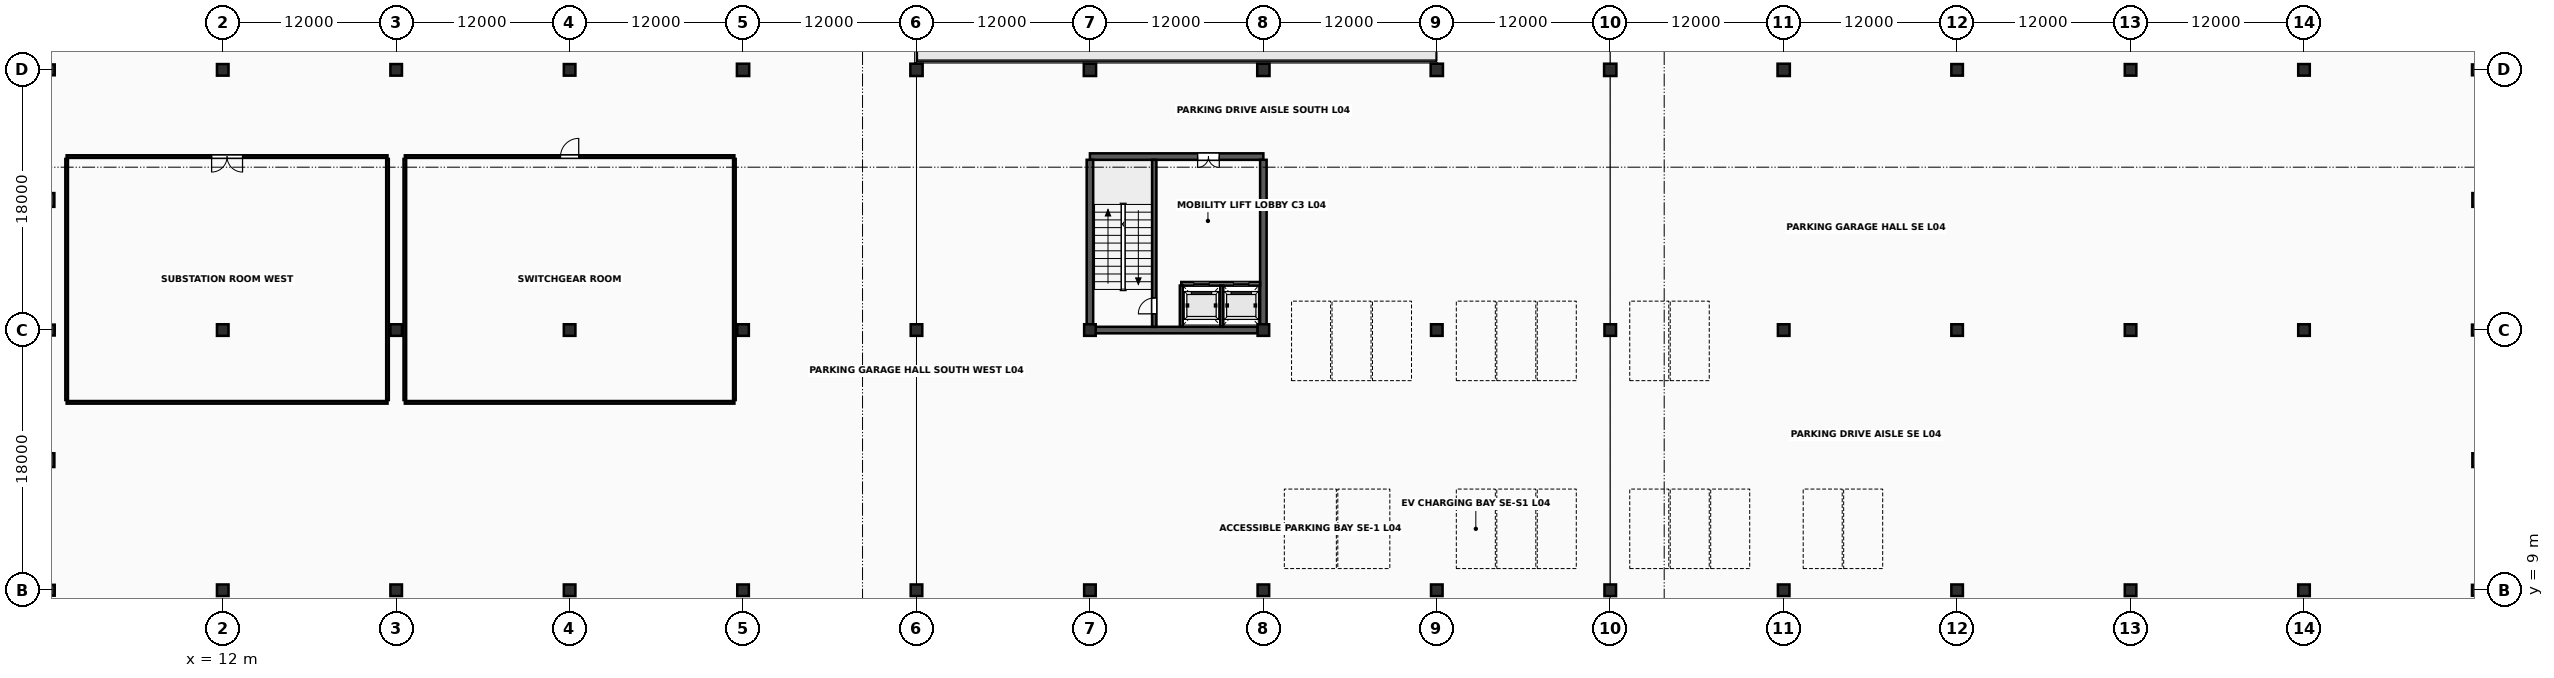
"""IFC4 building model, lengths in metres.
Left out: names, types, materials, properties, quantities, classifications, styles, units other than length and angle.
Written with IfcOpenShell. Run it as: python <this file> out.ifc"""

import sys

from ifc_helpers import new_model, si_unit, direction, frame, frame_2d, origin, origin_2d, place, context, subcontext, project, spatial, rectangle, extrude, element, fill, save


model = new_model("IFC4")
c1 = context("Model", 3, precision=1e-05, world=origin(), true_north=direction((0.0, 1.0)))
c2 = subcontext(c1, "Body", "Model", "MODEL_VIEW")
j1 = project(units=[si_unit("LENGTHUNIT", "METRE"), si_unit("PLANEANGLEUNIT", "RADIAN")], contexts=[c1])
p1 = place(None, origin())
s1 = spatial("IfcSite", under=j1, at=p1, CompositionType="ELEMENT")
p2 = place(p1, origin())
s2 = spatial("IfcBuilding", under=s1, at=p2, CompositionType="ELEMENT")
p3 = place(p2, frame((0.0, 0.0, 17.2)))
s3 = spatial("IfcBuildingStorey", under=s2, at=p3, CompositionType="ELEMENT", Elevation=17.2)
for number, where, z_axis, x_axis in (
    (1, (0.0, 9.0, 0.0), (0.0, 0.0, 1.0), (1.0, 0.0, 0.0)),
    (2, (0.0, 27.0, 0.0), (0.0, 0.0, 1.0), (1.0, 0.0, 0.0)),
    (3, (0.0, 45.0, 0.0), (0.0, 0.0, 1.0), (1.0, 0.0, 0.0)),
):
    element("IfcColumn", number, at=place(p3, frame(where, z_axis=z_axis, x_axis=x_axis)), inside=s3, PredefinedType="COLUMN", context=c2, shape_type="SweptSolid", body=[
        extrude(rectangle(XDim=0.75, YDim=0.75, at=origin_2d()), origin(), (0.0, 0.0, 1.0), 3.8),
    ])
for number, where, z_axis, x_axis in (
    (4, (12.0, 9.0, 0.0), (0.0, 0.0, 1.0), (1.0, 0.0, 0.0)),
    (5, (12.0, 27.0, 0.0), (0.0, 0.0, 1.0), (1.0, 0.0, 0.0)),
    (6, (12.0, 45.0, 0.0), (0.0, 0.0, 1.0), (1.0, 0.0, 0.0)),
    (7, (24.0, 9.0, 0.0), (0.0, 0.0, 1.0), (1.0, 0.0, 0.0)),
    (8, (24.0, 27.0, 0.0), (0.0, 0.0, 1.0), (1.0, 0.0, 0.0)),
    (9, (24.0, 45.0, 0.0), (0.0, 0.0, 1.0), (1.0, 0.0, 0.0)),
    (10, (36.0, 9.0, 0.0), (0.0, 0.0, 1.0), (1.0, 0.0, 0.0)),
    (11, (36.0, 27.0, 0.0), (0.0, 0.0, 1.0), (1.0, 0.0, 0.0)),
    (12, (36.0, 45.0, 0.0), (0.0, 0.0, 1.0), (1.0, 0.0, 0.0)),
    (13, (48.0, 9.0, 0.0), (0.0, 0.0, 1.0), (1.0, 0.0, 0.0)),
    (14, (48.0, 27.0, 0.0), (0.0, 0.0, 1.0), (1.0, 0.0, 0.0)),
):
    element("IfcColumn", number, at=place(p3, frame(where, z_axis=z_axis, x_axis=x_axis)), inside=s3, PredefinedType="COLUMN", context=c2, shape_type="SweptSolid", body=[
        extrude(rectangle(XDim=0.8, YDim=0.8, at=origin_2d()), origin(), (0.0, 0.0, 1.0), 3.8),
    ])
p4 = place(p3, frame((48.0, 45.0, 0.0), z_axis=(0.0, 0.0, 1.0), x_axis=(1.0, 0.0, 0.0)))
e15 = element("IfcColumn", 15, at=p4, inside=s3, PredefinedType="COLUMN", context=c2, shape_type="SweptSolid", body=[
    extrude(rectangle(XDim=0.85, YDim=0.85, at=origin_2d()), origin(), (0.0, 0.0, 1.0), 3.8),
])
for number, where, z_axis, x_axis in (
    (16, (60.0, 9.0, 0.0), (0.0, 0.0, 1.0), (1.0, 0.0, 0.0)),
    (17, (60.0, 27.0, 0.0), (0.0, 0.0, 1.0), (1.0, 0.0, 0.0)),
):
    element("IfcColumn", number, at=place(p3, frame(where, z_axis=z_axis, x_axis=x_axis)), inside=s3, PredefinedType="COLUMN", context=c2, shape_type="SweptSolid", body=[
        extrude(rectangle(XDim=0.8, YDim=0.8, at=origin_2d()), origin(), (0.0, 0.0, 1.0), 3.8),
    ])
p5 = place(p3, frame((60.0, 45.0, 0.0), z_axis=(0.0, 0.0, 1.0), x_axis=(1.0, 0.0, 0.0)))
e18 = element("IfcColumn", 18, at=p5, inside=s3, PredefinedType="COLUMN", context=c2, shape_type="SweptSolid", body=[
    extrude(rectangle(XDim=0.85, YDim=0.85, at=origin_2d()), origin(), (0.0, 0.0, 1.0), 3.8),
])
for number, where, z_axis, x_axis in (
    (19, (72.0, 9.0, 0.0), (0.0, 0.0, 1.0), (1.0, 0.0, 0.0)),
    (20, (72.0, 27.0, 0.0), (0.0, 0.0, 1.0), (1.0, 0.0, 0.0)),
):
    element("IfcColumn", number, at=place(p3, frame(where, z_axis=z_axis, x_axis=x_axis)), inside=s3, PredefinedType="COLUMN", context=c2, shape_type="SweptSolid", body=[
        extrude(rectangle(XDim=0.8, YDim=0.8, at=origin_2d()), origin(), (0.0, 0.0, 1.0), 3.8),
    ])
p6 = place(p3, frame((72.0, 45.0, 0.0), z_axis=(0.0, 0.0, 1.0), x_axis=(1.0, 0.0, 0.0)))
e21 = element("IfcColumn", 21, at=p6, inside=s3, PredefinedType="COLUMN", context=c2, shape_type="SweptSolid", body=[
    extrude(rectangle(XDim=0.85, YDim=0.85, at=origin_2d()), origin(), (0.0, 0.0, 1.0), 3.8),
])
for number, where, z_axis, x_axis in (
    (22, (84.0, 9.0, 0.0), (0.0, 0.0, 1.0), (1.0, 0.0, 0.0)),
    (23, (84.0, 27.0, 0.0), (0.0, 0.0, 1.0), (1.0, 0.0, 0.0)),
):
    element("IfcColumn", number, at=place(p3, frame(where, z_axis=z_axis, x_axis=x_axis)), inside=s3, PredefinedType="COLUMN", context=c2, shape_type="SweptSolid", body=[
        extrude(rectangle(XDim=0.8, YDim=0.8, at=origin_2d()), origin(), (0.0, 0.0, 1.0), 3.8),
    ])
p7 = place(p3, frame((84.0, 45.0, 0.0), z_axis=(0.0, 0.0, 1.0), x_axis=(1.0, 0.0, 0.0)))
e24 = element("IfcColumn", 24, at=p7, inside=s3, PredefinedType="COLUMN", context=c2, shape_type="SweptSolid", body=[
    extrude(rectangle(XDim=0.85, YDim=0.85, at=origin_2d()), origin(), (0.0, 0.0, 1.0), 3.8),
])
for number, where, z_axis, x_axis in (
    (25, (96.0, 9.0, 0.0), (0.0, 0.0, 1.0), (1.0, 0.0, 0.0)),
    (26, (96.0, 27.0, 0.0), (0.0, 0.0, 1.0), (1.0, 0.0, 0.0)),
):
    element("IfcColumn", number, at=place(p3, frame(where, z_axis=z_axis, x_axis=x_axis)), inside=s3, PredefinedType="COLUMN", context=c2, shape_type="SweptSolid", body=[
        extrude(rectangle(XDim=0.8, YDim=0.8, at=origin_2d()), origin(), (0.0, 0.0, 1.0), 3.8),
    ])
p8 = place(p3, frame((96.0, 45.0, 0.0), z_axis=(0.0, 0.0, 1.0), x_axis=(1.0, 0.0, 0.0)))
e27 = element("IfcColumn", 27, at=p8, inside=s3, PredefinedType="COLUMN", context=c2, shape_type="SweptSolid", body=[
    extrude(rectangle(XDim=0.85, YDim=0.85, at=origin_2d()), origin(), (0.0, 0.0, 1.0), 3.8),
])
for number, where, z_axis, x_axis in (
    (28, (108.0, 9.0, 0.0), (0.0, 0.0, 1.0), (1.0, 0.0, 0.0)),
    (29, (108.0, 27.0, 0.0), (0.0, 0.0, 1.0), (1.0, 0.0, 0.0)),
):
    element("IfcColumn", number, at=place(p3, frame(where, z_axis=z_axis, x_axis=x_axis)), inside=s3, PredefinedType="COLUMN", context=c2, shape_type="SweptSolid", body=[
        extrude(rectangle(XDim=0.8, YDim=0.8, at=origin_2d()), origin(), (0.0, 0.0, 1.0), 3.8),
    ])
p9 = place(p3, frame((108.0, 45.0, 0.0), z_axis=(0.0, 0.0, 1.0), x_axis=(1.0, 0.0, 0.0)))
e30 = element("IfcColumn", 30, at=p9, inside=s3, PredefinedType="COLUMN", context=c2, shape_type="SweptSolid", body=[
    extrude(rectangle(XDim=0.85, YDim=0.85, at=origin_2d()), origin(), (0.0, 0.0, 1.0), 3.8),
])
for number, where, z_axis, x_axis in (
    (31, (120.0, 9.0, 0.0), (0.0, 0.0, 1.0), (1.0, 0.0, 0.0)),
    (32, (120.0, 27.0, 0.0), (0.0, 0.0, 1.0), (1.0, 0.0, 0.0)),
):
    element("IfcColumn", number, at=place(p3, frame(where, z_axis=z_axis, x_axis=x_axis)), inside=s3, PredefinedType="COLUMN", context=c2, shape_type="SweptSolid", body=[
        extrude(rectangle(XDim=0.8, YDim=0.8, at=origin_2d()), origin(), (0.0, 0.0, 1.0), 3.8),
    ])
p10 = place(p3, frame((120.0, 45.0, 0.0), z_axis=(0.0, 0.0, 1.0), x_axis=(1.0, 0.0, 0.0)))
e33 = element("IfcColumn", 33, at=p10, inside=s3, PredefinedType="COLUMN", context=c2, shape_type="SweptSolid", body=[
    extrude(rectangle(XDim=0.85, YDim=0.85, at=origin_2d()), origin(), (0.0, 0.0, 1.0), 3.8),
])
for number, where, z_axis, x_axis in (
    (34, (132.0, 9.0, 0.0), (0.0, 0.0, 1.0), (1.0, 0.0, 0.0)),
    (35, (132.0, 27.0, 0.0), (0.0, 0.0, 1.0), (1.0, 0.0, 0.0)),
    (36, (132.0, 45.0, 0.0), (0.0, 0.0, 1.0), (1.0, 0.0, 0.0)),
    (37, (144.0, 9.0, 0.0), (0.0, 0.0, 1.0), (1.0, 0.0, 0.0)),
    (38, (144.0, 27.0, 0.0), (0.0, 0.0, 1.0), (1.0, 0.0, 0.0)),
    (39, (144.0, 45.0, 0.0), (0.0, 0.0, 1.0), (1.0, 0.0, 0.0)),
    (40, (156.0, 9.0, 0.0), (0.0, 0.0, 1.0), (1.0, 0.0, 0.0)),
    (41, (156.0, 27.0, 0.0), (0.0, 0.0, 1.0), (1.0, 0.0, 0.0)),
    (42, (156.0, 45.0, 0.0), (0.0, 0.0, 1.0), (1.0, 0.0, 0.0)),
):
    element("IfcColumn", number, at=place(p3, frame(where, z_axis=z_axis, x_axis=x_axis)), inside=s3, PredefinedType="COLUMN", context=c2, shape_type="SweptSolid", body=[
        extrude(rectangle(XDim=0.8, YDim=0.8, at=origin_2d()), origin(), (0.0, 0.0, 1.0), 3.8),
    ])
for number, where, z_axis, x_axis in (
    (43, (168.0, 9.0, 0.0), (0.0, 0.0, 1.0), (1.0, 0.0, 0.0)),
    (44, (168.0, 27.0, 0.0), (0.0, 0.0, 1.0), (1.0, 0.0, 0.0)),
    (45, (168.0, 45.0, 0.0), (0.0, 0.0, 1.0), (1.0, 0.0, 0.0)),
):
    element("IfcColumn", number, at=place(p3, frame(where, z_axis=z_axis, x_axis=x_axis)), inside=s3, PredefinedType="COLUMN", context=c2, shape_type="SweptSolid", body=[
        extrude(rectangle(XDim=0.75, YDim=0.75, at=origin_2d()), origin(), (0.0, 0.0, 1.0), 3.8),
    ])
for number, where, z_axis, x_axis in (
    (46, (0.0, 18.0, 0.0), (0.0, 0.0, 1.0), (1.0, 0.0, 0.0)),
    (47, (0.0, 36.0, 0.0), (0.0, 0.0, 1.0), (1.0, 0.0, 0.0)),
    (48, (168.0, 18.0, 0.0), (0.0, 0.0, 1.0), (1.0, 0.0, 0.0)),
    (49, (168.0, 36.0, 0.0), (0.0, 0.0, 1.0), (1.0, 0.0, 0.0)),
):
    element("IfcColumn", number, at=place(p3, frame(where, z_axis=z_axis, x_axis=x_axis)), inside=s3, PredefinedType="PILASTER", context=c2, shape_type="SweptSolid", body=[
        extrude(rectangle(XDim=0.7, YDim=0.95, at=origin_2d()), origin(), (0.0, 0.0, 1.0), 3.8),
    ])
p11 = place(p3, frame((72.397, 27.0, 0.0), z_axis=(0.0, 0.0, 1.0), x_axis=(1.0, 0.0, 0.0)))
e50 = element("IfcWall", 50, at=p11, inside=s3, PredefinedType="SHEAR", context=c2, shape_type="SweptSolid", body=[
    extrude(rectangle(XDim=11.206, YDim=0.45, at=frame_2d((5.603, 0.0))), origin(), (0.0, 0.0, 1.0), 3.643),
])
p12 = place(p3, frame((72.0, 39.0, 0.0), z_axis=(0.0, 0.0, 1.0), x_axis=(1.0, 0.0, 0.0)))
e51 = element("IfcWall", 51, at=p12, inside=s3, PredefinedType="SHEAR", context=c2, shape_type="SweptSolid", body=[
    extrude(rectangle(XDim=12.0, YDim=0.45, at=frame_2d((6.0, 0.0))), origin(), (0.0, 0.0, 1.0), 3.643),
])
p13 = place(p12, frame((7.45, 0.0, 0.0)))
e52 = element("IfcOpeningElement", 52, at=p13, cuts=e51, PredefinedType="OPENING", context=c2, shape_type="SweptSolid", body=[
    extrude(rectangle(XDim=1.5, YDim=2.25, at=frame_2d((0.75, 1.125))), frame((0.0, 0.24, 0.0), z_axis=(0.0, -1.0, 0.0), x_axis=(1.0, 0.0, 0.0)), (0.0, 0.0, 1.0), 0.48),
])
for number, where, z_axis, x_axis in (
    (53, (72.0, 27.397, 0.0), (0.0, 0.0, 1.0), (0.0, 1.0, 0.0)),
    (54, (84.0, 27.397, 0.0), (0.0, 0.0, 1.0), (0.0, 1.0, 0.0)),
):
    element("IfcWall", number, at=place(p3, frame(where, z_axis=z_axis, x_axis=x_axis)), inside=s3, PredefinedType="SHEAR", context=c2, shape_type="SweptSolid", body=[
        extrude(rectangle(XDim=11.381, YDim=0.45, at=frame_2d((5.69, 0.0))), origin(), (0.0, 0.0, 1.0), 3.643),
    ])
p14 = place(p3, frame((76.45, 27.222, 0.0), z_axis=(0.0, 0.0, 1.0), x_axis=(0.0, 1.0, 0.0)))
e55 = element("IfcWall", 55, at=p14, inside=s3, PredefinedType="SHEAR", context=c2, shape_type="SweptSolid", body=[
    extrude(rectangle(XDim=11.556, YDim=0.3, at=frame_2d((5.778, 0.0))), origin(), (0.0, 0.0, 1.0), 3.643),
])
p15 = place(p14, frame((0.9, 0.0, 0.0)))
e56 = element("IfcOpeningElement", 56, at=p15, cuts=e55, PredefinedType="OPENING", context=c2, shape_type="SweptSolid", body=[
    extrude(rectangle(XDim=1.1, YDim=2.2, at=frame_2d((0.55, 1.1))), frame((0.0, 0.165, 0.0), z_axis=(0.0, -1.0, 0.0), x_axis=(1.0, 0.0, 0.0)), (0.0, 0.0, 1.0), 0.33),
])
p16 = place(p3, frame((78.32, 30.2, 0.0), z_axis=(0.0, 0.0, 1.0), x_axis=(1.0, 0.0, 0.0)))
e57 = element("IfcWall", 57, at=p16, inside=s3, PredefinedType="SOLIDWALL", context=c2, shape_type="SweptSolid", body=[
    extrude(rectangle(XDim=5.458, YDim=0.25, at=frame_2d((2.729, 0.0))), origin(), (0.0, 0.0, 1.0), 3.643),
])
p17 = place(p16, frame((0.86, 0.0, 0.0)))
e58 = element("IfcOpeningElement", 58, at=p17, cuts=e57, PredefinedType="OPENING", context=c2, shape_type="SweptSolid", body=[
    extrude(rectangle(XDim=1.08, YDim=2.22, at=frame_2d((0.54, 1.11))), frame((0.0, 0.14, 0.0), z_axis=(0.0, -1.0, 0.0), x_axis=(1.0, 0.0, 0.0)), (0.0, 0.0, 1.0), 0.28),
])
p18 = place(p16, frame((3.61, 0.0, 0.0)))
e59 = element("IfcOpeningElement", 59, at=p18, cuts=e57, PredefinedType="OPENING", context=c2, shape_type="SweptSolid", body=[
    extrude(rectangle(XDim=1.08, YDim=2.22, at=frame_2d((0.54, 1.11))), frame((0.0, 0.14, 0.0), z_axis=(0.0, -1.0, 0.0), x_axis=(1.0, 0.0, 0.0)), (0.0, 0.0, 1.0), 0.28),
])
for number, where, z_axis, x_axis in (
    (60, (78.32, 27.225, 0.0), (0.0, 0.0, 1.0), (0.0, 1.0, 0.0)),
    (61, (81.12, 27.225, 0.0), (0.0, 0.0, 1.0), (0.0, 1.0, 0.0)),
):
    element("IfcWall", number, at=place(p3, frame(where, z_axis=z_axis, x_axis=x_axis)), inside=s3, PredefinedType="SOLIDWALL", context=c2, shape_type="SweptSolid", body=[
        extrude(rectangle(XDim=2.855, YDim=0.2, at=frame_2d((1.427, 0.0))), origin(), (0.0, 0.0, 1.0), 3.633),
    ])
p19 = place(p3, frame((1.2, 22.0, 0.0), z_axis=(0.0, 0.0, 1.0), x_axis=(1.0, 0.0, 0.0)))
e62 = element("IfcWall", 62, at=p19, inside=s3, PredefinedType="SOLIDWALL", context=c2, shape_type="SweptSolid", body=[
    extrude(rectangle(XDim=22.2, YDim=0.18, at=frame_2d((11.1, 0.0))), origin(), (0.0, 0.0, 1.0), 2.75),
])
p20 = place(p3, frame((1.2, 39.0, 0.0), z_axis=(0.0, 0.0, 1.0), x_axis=(1.0, 0.0, 0.0)))
e63 = element("IfcWall", 63, at=p20, inside=s3, PredefinedType="SOLIDWALL", context=c2, shape_type="SweptSolid", body=[
    extrude(rectangle(XDim=22.2, YDim=0.18, at=frame_2d((11.1, 0.0))), origin(), (0.0, 0.0, 1.0), 2.75),
])
p21 = place(p20, frame((10.03, 0.0, 0.0)))
e64 = element("IfcOpeningElement", 64, at=p21, cuts=e63, PredefinedType="OPENING", context=c2, shape_type="SweptSolid", body=[
    extrude(rectangle(XDim=2.14, YDim=2.44, at=frame_2d((1.07, 1.22))), frame((0.0, 0.105, 0.0), z_axis=(0.0, -1.0, 0.0), x_axis=(1.0, 0.0, 0.0)), (0.0, 0.0, 1.0), 0.21),
])
for number, where, z_axis, x_axis in (
    (65, (1.2, 22.16, 0.0), (0.0, 0.0, 1.0), (0.0, 1.0, 0.0)),
    (66, (23.4, 22.16, 0.0), (0.0, 0.0, 1.0), (0.0, 1.0, 0.0)),
):
    element("IfcWall", number, at=place(p3, frame(where, z_axis=z_axis, x_axis=x_axis)), inside=s3, PredefinedType="SOLIDWALL", context=c2, shape_type="SweptSolid", body=[
        extrude(rectangle(XDim=16.68, YDim=0.18, at=frame_2d((8.34, 0.0))), origin(), (0.0, 0.0, 1.0), 2.75),
    ])
p22 = place(p3, frame((24.6, 22.0, 0.0), z_axis=(0.0, 0.0, 1.0), x_axis=(1.0, 0.0, 0.0)))
e67 = element("IfcWall", 67, at=p22, inside=s3, PredefinedType="SOLIDWALL", context=c2, shape_type="SweptSolid", body=[
    extrude(rectangle(XDim=22.8, YDim=0.18, at=frame_2d((11.4, 0.0))), origin(), (0.0, 0.0, 1.0), 2.75),
])
p23 = place(p3, frame((24.6, 39.0, 0.0), z_axis=(0.0, 0.0, 1.0), x_axis=(1.0, 0.0, 0.0)))
e68 = element("IfcWall", 68, at=p23, inside=s3, PredefinedType="SOLIDWALL", context=c2, shape_type="SweptSolid", body=[
    extrude(rectangle(XDim=22.8, YDim=0.18, at=frame_2d((11.4, 0.0))), origin(), (0.0, 0.0, 1.0), 2.75),
])
p24 = place(p23, frame((10.77, 0.0, 0.0)))
e69 = element("IfcOpeningElement", 69, at=p24, cuts=e68, PredefinedType="OPENING", context=c2, shape_type="SweptSolid", body=[
    extrude(rectangle(XDim=1.26, YDim=2.16, at=frame_2d((0.63, 1.08))), frame((0.0, 0.105, 0.0), z_axis=(0.0, -1.0, 0.0), x_axis=(1.0, 0.0, 0.0)), (0.0, 0.0, 1.0), 0.21),
])
for number, where, z_axis, x_axis in (
    (70, (24.6, 22.16, 0.0), (0.0, 0.0, 1.0), (0.0, 1.0, 0.0)),
    (71, (47.4, 22.16, 0.0), (0.0, 0.0, 1.0), (0.0, 1.0, 0.0)),
):
    element("IfcWall", number, at=place(p3, frame(where, z_axis=z_axis, x_axis=x_axis)), inside=s3, PredefinedType="SOLIDWALL", context=c2, shape_type="SweptSolid", body=[
        extrude(rectangle(XDim=16.68, YDim=0.18, at=frame_2d((8.34, 0.0))), origin(), (0.0, 0.0, 1.0), 2.75),
    ])
p25 = place(p15, origin())
e72 = element("IfcDoor", 72, at=p25, inside=s3, OperationType="SINGLE_SWING_LEFT", PredefinedType="DOOR", context=c2, shape_type="SweptSolid", body=[
    extrude(rectangle(XDim=1.1, YDim=2.2, at=frame_2d((0.55, 1.1))), frame((0.0, 0.025, 0.0), z_axis=(0.0, -1.0, 0.0), x_axis=(1.0, 0.0, 0.0)), (0.0, 0.0, 1.0), 0.05),
])
fill(e56, e72)
p26 = place(p13, origin())
e73 = element("IfcDoor", 73, at=p26, inside=s3, OperationType="DOUBLE_DOOR_SINGLE_SWING", PredefinedType="DOOR", context=c2, shape_type="SweptSolid", body=[
    extrude(rectangle(XDim=1.5, YDim=2.25, at=frame_2d((0.75, 1.125))), frame((0.0, 0.025, 0.0), z_axis=(0.0, -1.0, 0.0), x_axis=(1.0, 0.0, 0.0)), (0.0, 0.0, 1.0), 0.05),
])
fill(e52, e73)
p27 = place(p17, origin())
e74 = element("IfcDoor", 74, at=p27, inside=s3, OperationType="SLIDING_TO_LEFT", PredefinedType="USERDEFINED", context=c2, shape_type="SweptSolid", body=[
    extrude(rectangle(XDim=1.08, YDim=2.22, at=frame_2d((0.54, 1.11))), frame((0.0, 0.025, 0.0), z_axis=(0.0, -1.0, 0.0), x_axis=(1.0, 0.0, 0.0)), (0.0, 0.0, 1.0), 0.05),
])
fill(e58, e74)
p28 = place(p18, origin())
e75 = element("IfcDoor", 75, at=p28, inside=s3, OperationType="SLIDING_TO_LEFT", PredefinedType="USERDEFINED", context=c2, shape_type="SweptSolid", body=[
    extrude(rectangle(XDim=1.08, YDim=2.22, at=frame_2d((0.54, 1.11))), frame((0.0, 0.025, 0.0), z_axis=(0.0, -1.0, 0.0), x_axis=(1.0, 0.0, 0.0)), (0.0, 0.0, 1.0), 0.05),
])
fill(e59, e75)
p29 = place(p21, origin())
e76 = element("IfcDoor", 76, at=p29, inside=s3, OperationType="DOUBLE_DOOR_SINGLE_SWING", PredefinedType="DOOR", context=c2, shape_type="SweptSolid", body=[
    extrude(rectangle(XDim=2.14, YDim=2.44, at=frame_2d((1.07, 1.22))), frame((0.0, 0.025, 0.0), z_axis=(0.0, -1.0, 0.0), x_axis=(1.0, 0.0, 0.0)), (0.0, 0.0, 1.0), 0.05),
])
fill(e64, e76)
p30 = place(p24, origin())
e77 = element("IfcDoor", 77, at=p30, inside=s3, OperationType="SINGLE_SWING_RIGHT", PredefinedType="DOOR", context=c2, shape_type="SweptSolid", body=[
    extrude(rectangle(XDim=1.26, YDim=2.16, at=frame_2d((0.63, 1.08))), frame((0.0, 0.025, 0.0), z_axis=(0.0, -1.0, 0.0), x_axis=(1.0, 0.0, 0.0)), (0.0, 0.0, 1.0), 0.05),
])
fill(e69, e77)
save(model, sys.argv[1])
